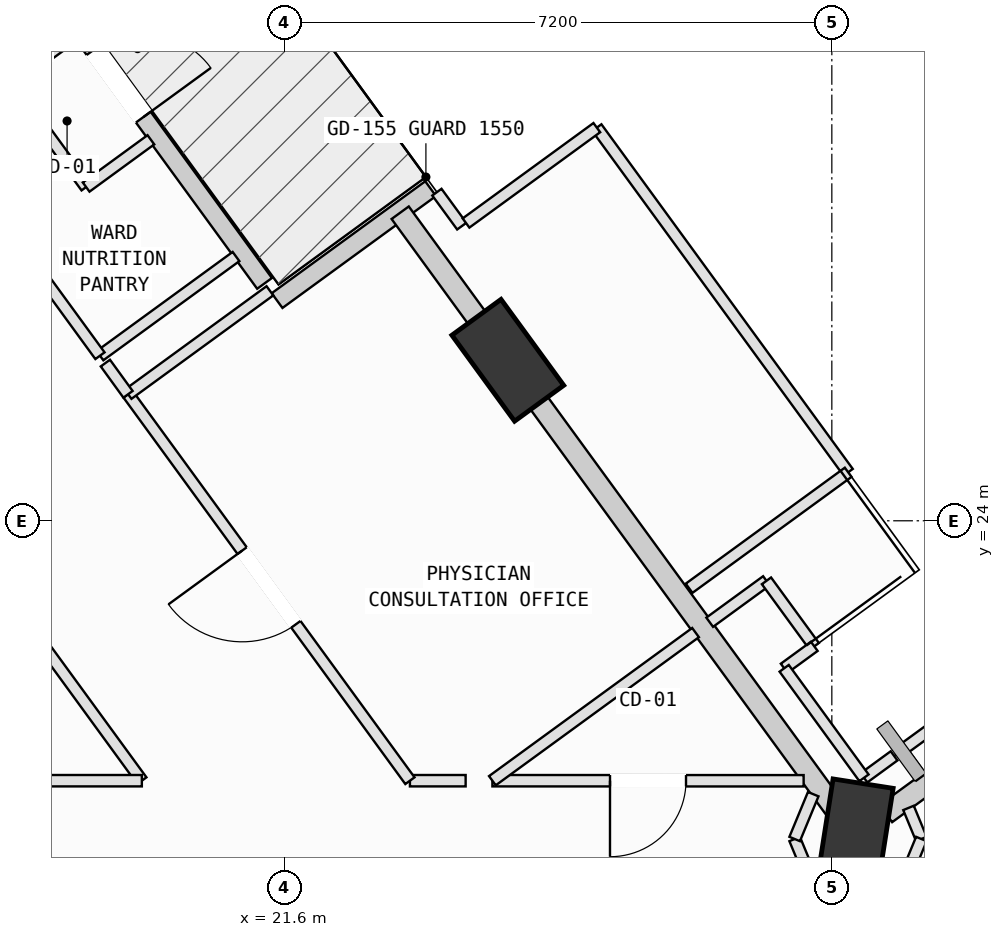
"""IFC4 building model, lengths in metres.
Left out: names, types, materials, properties, quantities, classifications, styles, units other than length and angle.
Written with IfcOpenShell. Run it as: python <this file> out.ifc"""

import sys

from ifc_helpers import new_model, si_unit, direction, frame, frame_2d, origin, origin_2d, place, context, subcontext, project, spatial, rectangle, extrude, element, fill, save


model = new_model("IFC4")
c1 = context("Model", 3, precision=1e-05, world=origin(), true_north=direction((0.0, 1.0)))
c2 = subcontext(c1, "Body", "Model", "MODEL_VIEW")
j1 = project(units=[si_unit("LENGTHUNIT", "METRE"), si_unit("PLANEANGLEUNIT", "RADIAN")], contexts=[c1])
p1 = place(None, origin())
s1 = spatial("IfcSite", under=j1, at=p1, CompositionType="ELEMENT")
p2 = place(p1, origin())
s2 = spatial("IfcBuilding", under=s1, at=p2, CompositionType="ELEMENT")
p3 = place(p2, frame((0.0, 0.0, 177.8)))
s3 = spatial("IfcBuildingStorey", under=s2, at=p3, CompositionType="ELEMENT", Elevation=177.8)
p4 = place(p3, frame((29.103, 19.85, 0.002), z_axis=(0.020701917139, -0.018442415858, 0.999615580073), x_axis=(-0.634495197242, 0.772441293225, 0.027391480385)))
e1 = element("IfcColumn", 1, at=p4, inside=s3, PredefinedType="COLUMN", context=c2, shape_type="SweptSolid", body=[
    extrude(rectangle(XDim=1.4, YDim=0.8, at=origin_2d()), origin(), (0.0, 0.0, 1.0), 3.998),
])
p5 = place(p3, frame((24.537, 26.112, 0.002), z_axis=(-0.005127954064, -0.037604996467, 0.999279524622), x_axis=(-0.474702077533, 0.879612161779, 0.030665655638)))
e2 = element("IfcColumn", 2, at=p5, inside=s3, PredefinedType="COLUMN", context=c2, shape_type="SweptSolid", body=[
    extrude(rectangle(XDim=1.4, YDim=0.8, at=origin_2d()), origin(), (0.0, 0.0, 1.0), 3.999),
])
p6 = place(p3, frame((17.236, 32.747, 0.0), z_axis=(0.0, 0.0, 1.0), x_axis=(0.589164046523, -0.808013444371, 0.0)))
e3 = element("IfcWall", 3, at=p6, inside=s3, PredefinedType="SOLIDWALL", context=c2, shape_type="SweptSolid", body=[
    extrude(rectangle(XDim=6.96, YDim=0.24, at=frame_2d((3.48, 0.0))), origin(), (0.0, 0.0, 1.0), 3.265),
])
p7 = place(p6, frame((3.152, 0.0, 0.0)))
e4 = element("IfcOpeningElement", 4, at=p7, cuts=e3, PredefinedType="OPENING", context=c2, shape_type="SweptSolid", body=[
    extrude(rectangle(XDim=1.1, YDim=2.15, at=frame_2d((0.55, 1.075))), frame((0.0, 0.13, 0.0), z_axis=(0.0, -1.0, 0.0), x_axis=(1.0, 0.0, 0.0)), (0.0, 0.0, 1.0), 0.26),
])
p8 = place(p3, frame((21.501, 26.897, 0.0), z_axis=(0.0, 0.0, 1.0), x_axis=(0.808013341442, 0.589164187686, 0.0)))
e5 = element("IfcWall", 5, at=p8, inside=s3, PredefinedType="SOLIDWALL", context=c2, shape_type="SweptSolid", body=[
    extrude(rectangle(XDim=2.5, YDim=0.24, at=frame_2d((1.25, 0.0))), origin(), (0.0, 0.0, 1.0), 3.265),
])
p9 = place(p3, frame((29.511, 20.147, 0.0), z_axis=(0.0, 0.0, 1.0), x_axis=(0.807984372864, 0.589203914793, 0.0)))
e6 = element("IfcWall", 6, at=p9, inside=s3, PredefinedType="SOLIDWALL", context=c2, shape_type="SweptSolid", body=[
    extrude(rectangle(XDim=5.96, YDim=0.28, at=frame_2d((2.98, 0.0))), origin(), (0.0, 0.0, 1.0), 3.265),
])
p10 = place(p3, frame((28.843, 20.207, 0.0), z_axis=(0.0, 0.0, 1.0), x_axis=(-0.589197701426, 0.807988903782, 0.0)))
e7 = element("IfcWall", 7, at=p10, inside=s3, PredefinedType="SOLIDWALL", context=c2, shape_type="SweptSolid", body=[
    extrude(rectangle(XDim=6.76, YDim=0.28, at=frame_2d((3.38, 0.0))), origin(), (0.0, 0.0, 1.0), 3.265),
])
p11 = place(p3, frame((24.278, 26.466, 0.0), z_axis=(0.0, 0.0, 1.0), x_axis=(-0.589146798516, 0.808026020496, 0.0)))
e8 = element("IfcWall", 8, at=p11, inside=s3, PredefinedType="SOLIDWALL", context=c2, shape_type="SweptSolid", body=[
    extrude(rectangle(XDim=1.964, YDim=0.28, at=frame_2d((0.982, 0.0))), origin(), (0.0, 0.0, 1.0), 3.245),
])
p12 = place(p3, frame((17.169, 24.081, 0.0), z_axis=(0.0, 0.0, 1.0), x_axis=(0.589199746841, -0.807987412231, 0.0)))
e9 = element("IfcWall", 9, at=p12, inside=s3, PredefinedType="PARTITIONING", context=c2, shape_type="SweptSolid", body=[
    extrude(rectangle(XDim=4.333, YDim=0.15, at=frame_2d((2.167, 0.0))), origin(), (0.0, 0.0, 1.0), 3.78),
])
p13 = place(p3, frame((19.722, 20.58, 0.0), z_axis=(0.0, 0.0, 1.0), x_axis=(-1.0, 0.0, 0.0)))
e10 = element("IfcWall", 10, at=p13, inside=s3, PredefinedType="PARTITIONING", context=c2, shape_type="SweptSolid", body=[
    extrude(rectangle(XDim=4.725, YDim=0.15, at=frame_2d((2.362, 0.0))), origin(), (0.0, 0.0, 1.0), 3.78),
])
p14 = place(p13, frame((1.762, 0.0, 0.0)))
e11 = element("IfcOpeningElement", 11, at=p14, cuts=e10, PredefinedType="OPENING", context=c2, shape_type="SweptSolid", body=[
    extrude(rectangle(XDim=1.2, YDim=2.15, at=frame_2d((0.6, 1.075))), frame((0.0, 0.085, 0.0), z_axis=(0.0, -1.0, 0.0), x_axis=(1.0, 0.0, 0.0)), (0.0, 0.0, 1.0), 0.17),
])
p15 = place(p3, frame((29.223, 20.618, 0.0), z_axis=(0.0, 0.0, 1.0), x_axis=(0.807701219135, 0.589592011995, 0.0)))
e12 = element("IfcWall", 12, at=p15, inside=s3, PredefinedType="PARTITIONING", context=c2, shape_type="SweptSolid", body=[
    extrude(rectangle(XDim=0.49, YDim=0.15, at=frame_2d((0.245, 0.0))), origin(), (0.0, 0.0, 1.0), 3.78),
])
p16 = place(p3, frame((29.809, 20.222, 0.0), z_axis=(0.0, 0.0, 1.0), x_axis=(0.381831882466, -0.92423179643, 0.0)))
e13 = element("IfcWall", 13, at=p16, inside=s3, PredefinedType="PARTITIONING", context=c2, shape_type="SweptSolid", body=[
    extrude(rectangle(XDim=0.442, YDim=0.15, at=frame_2d((0.221, 0.0))), origin(), (0.0, 0.0, 1.0), 3.78),
])
p17 = place(p3, frame((29.978, 19.813, 0.0), z_axis=(0.0, 0.0, 1.0), x_axis=(-0.382306769343, -0.924035461503, 0.0)))
e14 = element("IfcWall", 14, at=p17, inside=s3, PredefinedType="PARTITIONING", context=c2, shape_type="SweptSolid", body=[
    extrude(rectangle(XDim=0.639, YDim=0.15, at=frame_2d((0.319, 0.0))), origin(), (0.0, 0.0, 1.0), 3.78),
])
for number, where, z_axis, x_axis in (
    (15, (28.555, 19.223, 0.0), (0.0, 0.0, 1.0), (-0.382, 0.924, 0.0)),
    (16, (28.311, 19.813, 0.0), (0.0, 0.0, 1.0), (0.382, 0.924, 0.0)),
):
    element("IfcWall", number, at=place(p3, frame(where, z_axis=z_axis, x_axis=x_axis)), inside=s3, PredefinedType="PARTITIONING", context=c2, shape_type="SweptSolid", body=[
        extrude(rectangle(XDim=0.638, YDim=0.15, at=frame_2d((0.319, 0.0))), origin(), (0.0, 0.0, 1.0), 3.78),
    ])
p18 = place(p3, frame((28.429, 20.579, 0.0), z_axis=(0.0, 0.0, 1.0), x_axis=(-0.999999971564, 0.0002384785, 0.0)))
e17 = element("IfcWall", 17, at=p18, inside=s3, PredefinedType="PARTITIONING", context=c2, shape_type="SweptSolid", body=[
    extrude(rectangle(XDim=4.095, YDim=0.15, at=frame_2d((2.047, 0.0))), origin(), (0.0, 0.0, 1.0), 3.78),
])
p19 = place(p18, frame((1.548, 0.0, 0.0)))
e18 = element("IfcOpeningElement", 18, at=p19, cuts=e17, PredefinedType="OPENING", context=c2, shape_type="SweptSolid", body=[
    extrude(rectangle(XDim=1.0, YDim=2.12, at=frame_2d((0.5, 1.06))), frame((0.0, 0.085, 0.0), z_axis=(0.0, -1.0, 0.0), x_axis=(1.0, 0.0, 0.0)), (0.0, 0.0, 1.0), 0.17),
])
p20 = place(p3, frame((24.334, 20.58, 0.0), z_axis=(0.0, 0.0, 1.0), x_axis=(0.808030219446, 0.589141039532, 0.0)))
e19 = element("IfcWall", 19, at=p20, inside=s3, PredefinedType="PARTITIONING", context=c2, shape_type="SweptSolid", body=[
    extrude(rectangle(XDim=3.308, YDim=0.15, at=frame_2d((1.654, 0.0))), origin(), (0.0, 0.0, 1.0), 3.78),
])
p21 = place(p3, frame((27.193, 22.665, 0.0), z_axis=(0.0, 0.0, 1.0), x_axis=(0.807821533762, 0.589427153761, 0.0)))
e20 = element("IfcWall", 20, at=p21, inside=s3, PredefinedType="PARTITIONING", context=c2, shape_type="SweptSolid", body=[
    extrude(rectangle(XDim=0.925, YDim=0.15, at=frame_2d((0.462, 0.0))), origin(), (0.0, 0.0, 1.0), 3.78),
])
p22 = place(p3, frame((27.94, 23.21, 0.0), z_axis=(0.0, 0.0, 1.0), x_axis=(0.589517481751, -0.807755618185, 0.0)))
e21 = element("IfcWall", 21, at=p22, inside=s3, PredefinedType="PARTITIONING", context=c2, shape_type="SweptSolid", body=[
    extrude(rectangle(XDim=1.067, YDim=0.15, at=frame_2d((0.534, 0.0))), origin(), (0.0, 0.0, 1.0), 3.78),
])
p23 = place(p3, frame((28.569, 22.348, 0.0), z_axis=(0.0, 0.0, 1.0), x_axis=(-0.807938361971, -0.589267005063, 0.0)))
e22 = element("IfcWall", 22, at=p23, inside=s3, PredefinedType="PARTITIONING", context=c2, shape_type="SweptSolid", body=[
    extrude(rectangle(XDim=0.49, YDim=0.15, at=frame_2d((0.245, 0.0))), origin(), (0.0, 0.0, 1.0), 3.78),
])
p24 = place(p3, frame((28.173, 22.059, 0.0), z_axis=(0.0, 0.0, 1.0), x_axis=(0.588790291938, -0.808285835654, 0.0)))
e23 = element("IfcWall", 23, at=p24, inside=s3, PredefinedType="PARTITIONING", context=c2, shape_type="SweptSolid", body=[
    extrude(rectangle(XDim=1.783, YDim=0.15, at=frame_2d((0.892, 0.0))), origin(), (0.0, 0.0, 1.0), 3.78),
])
p25 = place(p3, frame((29.972, 20.626, 0.0), z_axis=(0.0, 0.0, 1.0), x_axis=(-0.587904822125, 0.808930108305, 0.0)))
e24 = element("IfcWall", 24, at=p25, inside=s3, PredefinedType="PARTITIONING", context=c2, shape_type="SweptSolid", body=[
    extrude(rectangle(XDim=0.435, YDim=0.15, at=frame_2d((0.218, 0.0))), origin(), (0.0, 0.0, 1.0), 3.78),
])
p26 = place(p3, frame((29.716, 20.978, 0.0), z_axis=(0.0, 0.0, 1.0), x_axis=(0.807964856264, 0.589230677275, 0.0)))
e25 = element("IfcWall", 25, at=p26, inside=s3, PredefinedType="PARTITIONING", context=c2, shape_type="SweptSolid", body=[
    extrude(rectangle(XDim=5.618, YDim=0.15, at=frame_2d((2.809, 0.0))), origin(), (0.0, 0.0, 1.0), 3.78),
])
p27 = place(p3, frame((23.982, 20.58, 0.0), z_axis=(0.0, 0.0, 1.0), x_axis=(-1.0, 0.0, 0.0)))
e26 = element("IfcWall", 26, at=p27, inside=s3, PredefinedType="PARTITIONING", context=c2, shape_type="SweptSolid", body=[
    extrude(rectangle(XDim=0.733, YDim=0.15, at=frame_2d((0.366, 0.0))), origin(), (0.0, 0.0, 1.0), 3.78),
])
p28 = place(p3, frame((23.249, 20.58, 0.0), z_axis=(0.0, 0.0, 1.0), x_axis=(-0.589195373933, 0.807990601019, 0.0)))
e27 = element("IfcWall", 27, at=p28, inside=s3, PredefinedType="PARTITIONING", context=c2, shape_type="SweptSolid", body=[
    extrude(rectangle(XDim=6.293, YDim=0.15, at=frame_2d((3.147, 0.0))), origin(), (0.0, 0.0, 1.0), 3.78),
])
p29 = place(p28, frame((2.547, 0.0, 0.0)))
e28 = element("IfcOpeningElement", 28, at=p29, cuts=e27, PredefinedType="OPENING", context=c2, shape_type="SweptSolid", body=[
    extrude(rectangle(XDim=1.2, YDim=2.15, at=frame_2d((0.6, 1.075))), frame((0.0, 0.085, 0.0), z_axis=(0.0, -1.0, 0.0), x_axis=(1.0, 0.0, 0.0)), (0.0, 0.0, 1.0), 0.17),
])
p30 = place(p3, frame((19.541, 25.665, 0.0), z_axis=(0.0, 0.0, 1.0), x_axis=(0.807958250953, 0.589239734503, 0.0)))
e29 = element("IfcWall", 29, at=p30, inside=s3, PredefinedType="PARTITIONING", context=c2, shape_type="SweptSolid", body=[
    extrude(rectangle(XDim=2.31, YDim=0.15, at=frame_2d((1.155, 0.0))), origin(), (0.0, 0.0, 1.0), 3.78),
])
p31 = place(p3, frame((23.604, 28.324, 0.0), z_axis=(0.0, 0.0, 1.0), x_axis=(0.590292880672, -0.807189144518, 0.0)))
e30 = element("IfcWall", 30, at=p31, inside=s3, PredefinedType="PARTITIONING", context=c2, shape_type="SweptSolid", body=[
    extrude(rectangle(XDim=0.554, YDim=0.15, at=frame_2d((0.277, 0.0))), origin(), (0.0, 0.0, 1.0), 3.78),
])
p32 = place(p3, frame((18.839, 30.387, 0.0), z_axis=(0.0, 0.0, 1.0), x_axis=(-0.807653927486, -0.589656792903, 0.0)))
e31 = element("IfcWall", 31, at=p32, inside=s3, PredefinedType="PARTITIONING", context=c2, shape_type="SweptSolid", body=[
    extrude(rectangle(XDim=1.055, YDim=0.15, at=frame_2d((0.527, 0.0))), origin(), (0.0, 0.0, 1.0), 3.78),
])
p33 = place(p3, frame((17.987, 29.765, 0.0), z_axis=(0.0, 0.0, 1.0), x_axis=(0.589263942503, -0.807940595629, 0.0)))
e32 = element("IfcWall", 32, at=p33, inside=s3, PredefinedType="PARTITIONING", context=c2, shape_type="SweptSolid", body=[
    extrude(rectangle(XDim=1.7, YDim=0.15, at=frame_2d((0.85, 0.0))), origin(), (0.0, 0.0, 1.0), 3.78),
])
p34 = place(p3, frame((18.989, 28.391, 0.0), z_axis=(0.0, 0.0, 1.0), x_axis=(0.807764139301, 0.589505805959, 0.0)))
e33 = element("IfcWall", 33, at=p34, inside=s3, PredefinedType="PARTITIONING", context=c2, shape_type="SweptSolid", body=[
    extrude(rectangle(XDim=1.055, YDim=0.15, at=frame_2d((0.527, 0.0))), origin(), (0.0, 0.0, 1.0), 3.78),
])
p35 = place(p3, frame((20.961, 27.477, 0.0), z_axis=(0.0, 0.0, 1.0), x_axis=(-0.808073108898, -0.589082210456, 0.0)))
e34 = element("IfcWall", 34, at=p35, inside=s3, PredefinedType="PARTITIONING", context=c2, shape_type="SweptSolid", body=[
    extrude(rectangle(XDim=2.215, YDim=0.15, at=frame_2d((1.107, 0.0))), origin(), (0.0, 0.0, 1.0), 3.78),
])
p36 = place(p3, frame((19.171, 26.172, 0.0), z_axis=(0.0, 0.0, 1.0), x_axis=(-0.589139140752, 0.808031603858, 0.0)))
e35 = element("IfcWall", 35, at=p36, inside=s3, PredefinedType="PARTITIONING", context=c2, shape_type="SweptSolid", body=[
    extrude(rectangle(XDim=5.129, YDim=0.15, at=frame_2d((2.565, 0.0))), origin(), (0.0, 0.0, 1.0), 3.78),
])
p37 = place(p36, frame((2.105, 0.0, 0.0)))
e36 = element("IfcOpeningElement", 36, at=p37, cuts=e35, PredefinedType="OPENING", context=c2, shape_type="SweptSolid", body=[
    extrude(rectangle(XDim=0.92, YDim=2.1, at=frame_2d((0.46, 1.05))), frame((0.0, 0.085, 0.0), z_axis=(0.0, -1.0, 0.0), x_axis=(1.0, 0.0, 0.0)), (0.0, 0.0, 1.0), 0.17),
])
p38 = place(p3, frame((19.242, 26.075, 0.0), z_axis=(0.0, 0.0, 1.0), x_axis=(0.587227615189, -0.809421847963, 0.0)))
e37 = element("IfcWall", 37, at=p38, inside=s3, PredefinedType="PARTITIONING", context=c2, shape_type="SweptSolid", body=[
    extrude(rectangle(XDim=0.508, YDim=0.15, at=frame_2d((0.254, 0.0))), origin(), (0.0, 0.0, 1.0), 3.78),
])
p39 = place(p3, frame((25.708, 29.173, 0.0), z_axis=(0.0, 0.0, 1.0), x_axis=(0.589172157449, -0.808007530216, 0.0)))
e38 = element("IfcWall", 38, at=p39, inside=s3, PredefinedType="PARTITIONING", context=c2, shape_type="SweptSolid", body=[
    extrude(rectangle(XDim=5.613, YDim=0.15, at=frame_2d((2.806, 0.0))), origin(), (0.0, 0.0, 1.0), 3.78),
])
p40 = place(p3, frame((29.015, 24.638, 0.0), z_axis=(0.0, 0.0, 1.0), x_axis=(-0.808026227574, -0.589146514505, 0.0)))
e39 = element("IfcWall", 39, at=p40, inside=s3, PredefinedType="PARTITIONING", context=c2, shape_type="SweptSolid", body=[
    extrude(rectangle(XDim=2.59, YDim=0.15, at=frame_2d((1.295, 0.0))), origin(), (0.0, 0.0, 1.0), 3.78),
])
p41 = place(p3, frame((23.987, 27.918, 0.0), z_axis=(0.0, 0.0, 1.0), x_axis=(0.80794727728, 0.589254781174, 0.0)))
e40 = element("IfcWall", 40, at=p41, inside=s3, PredefinedType="PARTITIONING", context=c2, shape_type="SweptSolid", body=[
    extrude(rectangle(XDim=2.13, YDim=0.15, at=frame_2d((1.065, 0.0))), origin(), (0.0, 0.0, 1.0), 3.78),
])
p42 = place(p7, origin())
e41 = element("IfcDoor", 41, at=p42, inside=s3, OperationType="SINGLE_SWING_RIGHT", PredefinedType="DOOR", context=c2, shape_type="SweptSolid", body=[
    extrude(rectangle(XDim=1.1, YDim=2.15, at=frame_2d((0.55, 1.075))), frame((0.0, 0.025, 0.0), z_axis=(0.0, -1.0, 0.0), x_axis=(1.0, 0.0, 0.0)), (0.0, 0.0, 1.0), 0.05),
])
fill(e4, e41)
p43 = place(p19, origin())
e42 = element("IfcDoor", 42, at=p43, inside=s3, OperationType="SINGLE_SWING_RIGHT", PredefinedType="DOOR", context=c2, shape_type="SweptSolid", body=[
    extrude(rectangle(XDim=1.0, YDim=2.12, at=frame_2d((0.5, 1.06))), frame((0.0, 0.025, 0.0), z_axis=(0.0, -1.0, 0.0), x_axis=(1.0, 0.0, 0.0)), (0.0, 0.0, 1.0), 0.05),
])
fill(e18, e42)
p44 = place(p29, origin())
e43 = element("IfcDoor", 43, at=p44, inside=s3, OperationType="SINGLE_SWING_RIGHT", PredefinedType="DOOR", context=c2, shape_type="SweptSolid", body=[
    extrude(rectangle(XDim=1.2, YDim=2.15, at=frame_2d((0.6, 1.075))), frame((0.0, 0.025, 0.0), z_axis=(0.0, -1.0, 0.0), x_axis=(1.0, 0.0, 0.0)), (0.0, 0.0, 1.0), 0.05),
])
fill(e28, e43)
save(model, sys.argv[1])
